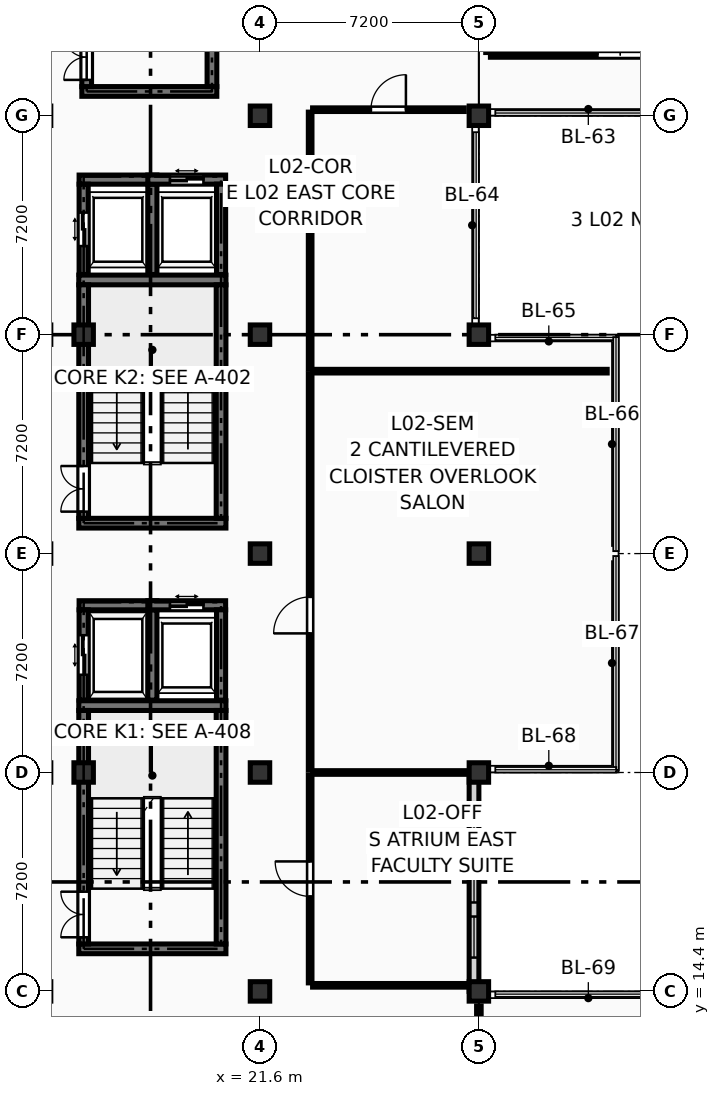
"""IFC4 building model, lengths in metres.
Left out: names, types, materials, properties, quantities, classifications, styles, units other than length and angle.
Written with IfcOpenShell. Run it as: python <this file> out.ifc"""

import sys

from ifc_helpers import new_model, si_unit, direction, frame, frame_2d, origin, origin_2d, place, context, subcontext, project, spatial, rectangle, extrude, element, fill, save


model = new_model("IFC4")
c1 = context("Model", 3, precision=1e-05, world=origin(), true_north=direction((0.0, 1.0)))
c2 = subcontext(c1, "Body", "Model", "MODEL_VIEW")
j1 = project(units=[si_unit("LENGTHUNIT", "METRE"), si_unit("PLANEANGLEUNIT", "RADIAN")], contexts=[c1])
p1 = place(None, origin())
s1 = spatial("IfcSite", under=j1, at=p1, CompositionType="ELEMENT")
p2 = place(p1, origin())
s2 = spatial("IfcBuilding", under=s1, at=p2, CompositionType="ELEMENT")
p3 = place(p2, frame((0.0, 0.0, 8.55)))
s3 = spatial("IfcBuildingStorey", under=s2, at=p3, CompositionType="ELEMENT", Elevation=8.55)
for number, where, z_axis, x_axis in (
    (1, (15.8, 21.6, 0.0), (0.0, 0.0, 1.0), (1.0, 0.0, 0.0)),
    (2, (15.8, 36.0, 0.0), (0.0, 0.0, 1.0), (1.0, 0.0, 0.0)),
    (3, (21.6, 14.4, 0.0), (0.0, 0.0, 1.0), (1.0, 0.0, 0.0)),
    (4, (21.6, 21.6, 0.0), (0.0, 0.0, 1.0), (1.0, 0.0, 0.0)),
    (5, (21.6, 28.8, 0.0), (0.0, 0.0, 1.0), (1.0, 0.0, 0.0)),
    (6, (21.6, 36.0, 0.0), (0.0, 0.0, 1.0), (1.0, 0.0, 0.0)),
    (7, (21.6, 43.2, 0.0), (0.0, 0.0, 1.0), (1.0, 0.0, 0.0)),
    (8, (28.8, 14.4, 0.0), (0.0, 0.0, 1.0), (1.0, 0.0, 0.0)),
    (9, (28.8, 21.6, 0.0), (0.0, 0.0, 1.0), (1.0, 0.0, 0.0)),
    (10, (28.8, 28.8, 0.0), (0.0, 0.0, 1.0), (1.0, 0.0, 0.0)),
    (11, (28.8, 36.0, 0.0), (0.0, 0.0, 1.0), (1.0, 0.0, 0.0)),
    (12, (28.8, 43.2, 0.0), (0.0, 0.0, 1.0), (1.0, 0.0, 0.0)),
):
    element("IfcColumn", number, at=place(p3, frame(where, z_axis=z_axis, x_axis=x_axis)), inside=s3, PredefinedType="COLUMN", context=c2, shape_type="SweptSolid", body=[
        extrude(rectangle(XDim=0.64, YDim=0.64, at=origin_2d()), origin(), (0.0, 0.0, 1.0), 3.6),
    ])
p4 = place(p3, frame((28.64, 14.4, 0.0), z_axis=(0.0, 0.0, 1.0), x_axis=(0.0, 1.0, 0.0)))
e13 = element("IfcWall", 13, at=p4, inside=s3, PredefinedType="SOLIDWALL", context=c2, shape_type="SweptSolid", body=[
    extrude(rectangle(XDim=7.2, YDim=0.32, at=frame_2d((3.6, 0.0))), origin(), (0.0, 0.0, 1.0), 2.84),
])
p5 = place(p4, frame((1.113, 0.0, 0.18)))
e14 = element("IfcOpeningElement", 14, at=p5, cuts=e13, PredefinedType="OPENING", context=c2, shape_type="SweptSolid", body=[
    extrude(rectangle(XDim=1.35, YDim=2.45, at=frame_2d((0.675, 1.225))), frame((0.0, 0.172, 0.0), z_axis=(0.0, -1.0, 0.0), x_axis=(1.0, 0.0, 0.0)), (0.0, 0.0, 1.0), 0.344),
])
p6 = place(p4, frame((2.925, 0.0, 0.18)))
e15 = element("IfcOpeningElement", 15, at=p6, cuts=e13, PredefinedType="OPENING", context=c2, shape_type="SweptSolid", body=[
    extrude(rectangle(XDim=1.35, YDim=2.45, at=frame_2d((0.675, 1.225))), frame((0.0, 0.172, 0.0), z_axis=(0.0, -1.0, 0.0), x_axis=(1.0, 0.0, 0.0)), (0.0, 0.0, 1.0), 0.344),
])
p7 = place(p4, frame((4.738, 0.0, 0.18)))
e16 = element("IfcOpeningElement", 16, at=p7, cuts=e13, PredefinedType="OPENING", context=c2, shape_type="SweptSolid", body=[
    extrude(rectangle(XDim=1.35, YDim=2.45, at=frame_2d((0.675, 1.225))), frame((0.0, 0.172, 0.0), z_axis=(0.0, -1.0, 0.0), x_axis=(1.0, 0.0, 0.0)), (0.0, 0.0, 1.0), 0.344),
])
for number, where, z_axis, x_axis in (
    (17, (15.64, 15.8, 0.0), (0.0, 0.0, 1.0), (1.0, 0.0, 0.0)),
    (18, (15.64, 23.8, 0.0), (0.0, 0.0, 1.0), (1.0, 0.0, 0.0)),
):
    element("IfcWall", number, at=place(p3, frame(where, z_axis=z_axis, x_axis=x_axis)), inside=s3, PredefinedType="SHEAR", context=c2, shape_type="SweptSolid", body=[
        extrude(rectangle(XDim=4.84, YDim=0.32, at=frame_2d((2.42, 0.0))), origin(), (0.0, 0.0, 1.0), 3.39),
    ])
p8 = place(p3, frame((15.8, 15.96, 0.0), z_axis=(0.0, 0.0, 1.0), x_axis=(0.0, 1.0, 0.0)))
e19 = element("IfcWall", 19, at=p8, inside=s3, PredefinedType="SHEAR", context=c2, shape_type="SweptSolid", body=[
    extrude(rectangle(XDim=7.68, YDim=0.32, at=frame_2d((3.84, 0.0))), origin(), (0.0, 0.0, 1.0), 3.39),
])
p9 = place(p8, frame((0.22, 0.0, 0.0)))
e20 = element("IfcOpeningElement", 20, at=p9, cuts=e19, PredefinedType="OPENING", context=c2, shape_type="SweptSolid", body=[
    extrude(rectangle(XDim=1.5, YDim=2.2, at=frame_2d((0.75, 1.1))), frame((0.0, 0.172, 0.0), z_axis=(0.0, -1.0, 0.0), x_axis=(1.0, 0.0, 0.0)), (0.0, 0.0, 1.0), 0.344),
])
p10 = place(p3, frame((20.32, 15.96, 0.0), z_axis=(0.0, 0.0, 1.0), x_axis=(0.0, 1.0, 0.0)))
e21 = element("IfcWall", 21, at=p10, inside=s3, PredefinedType="SHEAR", context=c2, shape_type="SweptSolid", body=[
    extrude(rectangle(XDim=7.68, YDim=0.32, at=frame_2d((3.84, 0.0))), origin(), (0.0, 0.0, 1.0), 3.39),
])
for number, where, z_axis, x_axis in (
    (22, (15.64, 29.8, 0.0), (0.0, 0.0, 1.0), (1.0, 0.0, 0.0)),
    (23, (15.64, 37.8, 0.0), (0.0, 0.0, 1.0), (1.0, 0.0, 0.0)),
):
    element("IfcWall", number, at=place(p3, frame(where, z_axis=z_axis, x_axis=x_axis)), inside=s3, PredefinedType="SHEAR", context=c2, shape_type="SweptSolid", body=[
        extrude(rectangle(XDim=4.84, YDim=0.32, at=frame_2d((2.42, 0.0))), origin(), (0.0, 0.0, 1.0), 3.39),
    ])
p11 = place(p3, frame((15.8, 29.96, 0.0), z_axis=(0.0, 0.0, 1.0), x_axis=(0.0, 1.0, 0.0)))
e24 = element("IfcWall", 24, at=p11, inside=s3, PredefinedType="SHEAR", context=c2, shape_type="SweptSolid", body=[
    extrude(rectangle(XDim=7.68, YDim=0.32, at=frame_2d((3.84, 0.0))), origin(), (0.0, 0.0, 1.0), 3.39),
])
p12 = place(p11, frame((0.22, 0.0, 0.0)))
e25 = element("IfcOpeningElement", 25, at=p12, cuts=e24, PredefinedType="OPENING", context=c2, shape_type="SweptSolid", body=[
    extrude(rectangle(XDim=1.5, YDim=2.2, at=frame_2d((0.75, 1.1))), frame((0.0, 0.172, 0.0), z_axis=(0.0, -1.0, 0.0), x_axis=(1.0, 0.0, 0.0)), (0.0, 0.0, 1.0), 0.344),
])
p13 = place(p3, frame((20.32, 29.96, 0.0), z_axis=(0.0, 0.0, 1.0), x_axis=(0.0, 1.0, 0.0)))
e26 = element("IfcWall", 26, at=p13, inside=s3, PredefinedType="SHEAR", context=c2, shape_type="SweptSolid", body=[
    extrude(rectangle(XDim=7.68, YDim=0.32, at=frame_2d((3.84, 0.0))), origin(), (0.0, 0.0, 1.0), 3.39),
])
p14 = place(p3, frame((15.74, 44.0, 0.0), z_axis=(0.0, 0.0, 1.0), x_axis=(1.0, 0.0, 0.0)))
e27 = element("IfcWall", 27, at=p14, inside=s3, PredefinedType="SHEAR", context=c2, shape_type="SweptSolid", body=[
    extrude(rectangle(XDim=4.44, YDim=0.32, at=frame_2d((2.22, 0.0))), origin(), (0.0, 0.0, 1.0), 3.39),
])
p15 = place(p3, frame((15.9, 44.16, 0.0), z_axis=(0.0, 0.0, 1.0), x_axis=(0.0, 1.0, 0.0)))
e28 = element("IfcWall", 28, at=p15, inside=s3, PredefinedType="SHEAR", context=c2, shape_type="SweptSolid", body=[
    extrude(rectangle(XDim=7.28, YDim=0.32, at=frame_2d((3.64, 0.0))), origin(), (0.0, 0.0, 1.0), 3.39),
])
p16 = place(p15, frame((0.22, 0.0, 0.0)))
e29 = element("IfcOpeningElement", 29, at=p16, cuts=e28, PredefinedType="OPENING", context=c2, shape_type="SweptSolid", body=[
    extrude(rectangle(XDim=1.5, YDim=2.2, at=frame_2d((0.75, 1.1))), frame((0.0, 0.172, 0.0), z_axis=(0.0, -1.0, 0.0), x_axis=(1.0, 0.0, 0.0)), (0.0, 0.0, 1.0), 0.344),
])
p17 = place(p3, frame((20.02, 44.16, 0.0), z_axis=(0.0, 0.0, 1.0), x_axis=(0.0, 1.0, 0.0)))
e30 = element("IfcWall", 30, at=p17, inside=s3, PredefinedType="SHEAR", context=c2, shape_type="SweptSolid", body=[
    extrude(rectangle(XDim=7.28, YDim=0.32, at=frame_2d((3.64, 0.0))), origin(), (0.0, 0.0, 1.0), 3.39),
])
p18 = place(p3, frame((15.65, 27.1, 0.0), z_axis=(0.0, 0.0, 1.0), x_axis=(1.0, 0.0, 0.0)))
e31 = element("IfcWall", 31, at=p18, inside=s3, PredefinedType="SHEAR", context=c2, shape_type="SweptSolid", body=[
    extrude(rectangle(XDim=2.56, YDim=0.3, at=frame_2d((1.28, 0.0))), origin(), (0.0, 0.0, 1.0), 3.39),
])
p19 = place(p3, frame((15.8, 23.98, 0.0), z_axis=(0.0, 0.0, 1.0), x_axis=(0.0, 1.0, 0.0)))
e32 = element("IfcWall", 32, at=p19, inside=s3, PredefinedType="SHEAR", context=c2, shape_type="SweptSolid", body=[
    extrude(rectangle(XDim=2.97, YDim=0.3, at=frame_2d((1.485, 0.0))), origin(), (0.0, 0.0, 1.0), 3.39),
])
p20 = place(p19, frame((0.835, 0.0, 0.0)))
e33 = element("IfcOpeningElement", 33, at=p20, cuts=e32, PredefinedType="OPENING", context=c2, shape_type="SweptSolid", body=[
    extrude(rectangle(XDim=1.3, YDim=2.25, at=frame_2d((0.65, 1.125))), frame((0.0, 0.162, 0.0), z_axis=(0.0, -1.0, 0.0), x_axis=(1.0, 0.0, 0.0)), (0.0, 0.0, 1.0), 0.324),
])
p21 = place(p3, frame((18.06, 23.98, 0.0), z_axis=(0.0, 0.0, 1.0), x_axis=(0.0, 1.0, 0.0)))
e34 = element("IfcWall", 34, at=p21, inside=s3, PredefinedType="SHEAR", context=c2, shape_type="SweptSolid", body=[
    extrude(rectangle(XDim=2.97, YDim=0.3, at=frame_2d((1.485, 0.0))), origin(), (0.0, 0.0, 1.0), 3.39),
])
p22 = place(p3, frame((17.91, 27.1, 0.0), z_axis=(0.0, 0.0, 1.0), x_axis=(1.0, 0.0, 0.0)))
e35 = element("IfcWall", 35, at=p22, inside=s3, PredefinedType="SHEAR", context=c2, shape_type="SweptSolid", body=[
    extrude(rectangle(XDim=2.56, YDim=0.3, at=frame_2d((1.28, 0.0))), origin(), (0.0, 0.0, 1.0), 3.39),
])
p23 = place(p22, frame((0.73, 0.0, 0.0)))
e36 = element("IfcOpeningElement", 36, at=p23, cuts=e35, PredefinedType="OPENING", context=c2, shape_type="SweptSolid", body=[
    extrude(rectangle(XDim=1.1, YDim=2.2, at=frame_2d((0.55, 1.1))), frame((0.0, 0.162, 0.0), z_axis=(0.0, -1.0, 0.0), x_axis=(1.0, 0.0, 0.0)), (0.0, 0.0, 1.0), 0.324),
])
p24 = place(p3, frame((20.32, 23.98, 0.0), z_axis=(0.0, 0.0, 1.0), x_axis=(0.0, 1.0, 0.0)))
e37 = element("IfcWall", 37, at=p24, inside=s3, PredefinedType="SHEAR", context=c2, shape_type="SweptSolid", body=[
    extrude(rectangle(XDim=2.97, YDim=0.3, at=frame_2d((1.485, 0.0))), origin(), (0.0, 0.0, 1.0), 3.39),
])
p25 = place(p3, frame((15.65, 41.1, 0.0), z_axis=(0.0, 0.0, 1.0), x_axis=(1.0, 0.0, 0.0)))
e38 = element("IfcWall", 38, at=p25, inside=s3, PredefinedType="SHEAR", context=c2, shape_type="SweptSolid", body=[
    extrude(rectangle(XDim=2.56, YDim=0.3, at=frame_2d((1.28, 0.0))), origin(), (0.0, 0.0, 1.0), 3.39),
])
p26 = place(p3, frame((15.8, 37.98, 0.0), z_axis=(0.0, 0.0, 1.0), x_axis=(0.0, 1.0, 0.0)))
e39 = element("IfcWall", 39, at=p26, inside=s3, PredefinedType="SHEAR", context=c2, shape_type="SweptSolid", body=[
    extrude(rectangle(XDim=2.97, YDim=0.3, at=frame_2d((1.485, 0.0))), origin(), (0.0, 0.0, 1.0), 3.39),
])
p27 = place(p26, frame((0.935, 0.0, 0.0)))
e40 = element("IfcOpeningElement", 40, at=p27, cuts=e39, PredefinedType="OPENING", context=c2, shape_type="SweptSolid", body=[
    extrude(rectangle(XDim=1.1, YDim=2.2, at=frame_2d((0.55, 1.1))), frame((0.0, 0.162, 0.0), z_axis=(0.0, -1.0, 0.0), x_axis=(1.0, 0.0, 0.0)), (0.0, 0.0, 1.0), 0.324),
])
p28 = place(p3, frame((18.06, 37.98, 0.0), z_axis=(0.0, 0.0, 1.0), x_axis=(0.0, 1.0, 0.0)))
e41 = element("IfcWall", 41, at=p28, inside=s3, PredefinedType="SHEAR", context=c2, shape_type="SweptSolid", body=[
    extrude(rectangle(XDim=2.97, YDim=0.3, at=frame_2d((1.485, 0.0))), origin(), (0.0, 0.0, 1.0), 3.39),
])
p29 = place(p3, frame((17.91, 41.1, 0.0), z_axis=(0.0, 0.0, 1.0), x_axis=(1.0, 0.0, 0.0)))
e42 = element("IfcWall", 42, at=p29, inside=s3, PredefinedType="SHEAR", context=c2, shape_type="SweptSolid", body=[
    extrude(rectangle(XDim=2.56, YDim=0.3, at=frame_2d((1.28, 0.0))), origin(), (0.0, 0.0, 1.0), 3.39),
])
p30 = place(p29, frame((0.73, 0.0, 0.0)))
e43 = element("IfcOpeningElement", 43, at=p30, cuts=e42, PredefinedType="OPENING", context=c2, shape_type="SweptSolid", body=[
    extrude(rectangle(XDim=1.1, YDim=2.2, at=frame_2d((0.55, 1.1))), frame((0.0, 0.162, 0.0), z_axis=(0.0, -1.0, 0.0), x_axis=(1.0, 0.0, 0.0)), (0.0, 0.0, 1.0), 0.324),
])
p31 = place(p3, frame((20.32, 37.98, 0.0), z_axis=(0.0, 0.0, 1.0), x_axis=(0.0, 1.0, 0.0)))
e44 = element("IfcWall", 44, at=p31, inside=s3, PredefinedType="SHEAR", context=c2, shape_type="SweptSolid", body=[
    extrude(rectangle(XDim=2.97, YDim=0.3, at=frame_2d((1.485, 0.0))), origin(), (0.0, 0.0, 1.0), 3.39),
])
p32 = place(p3, frame((28.8, 9.68, 0.0), z_axis=(0.0, 0.0, 1.0), x_axis=(0.0, 1.0, 0.0)))
e45 = element("IfcWall", 45, at=p32, inside=s3, PredefinedType="PARTITIONING", context=c2, shape_type="SweptSolid", body=[
    extrude(rectangle(XDim=4.24, YDim=0.15, at=frame_2d((2.12, 0.0))), origin(), (0.0, 0.0, 1.0), 2.655),
])
p33 = place(p3, frame((23.25, 14.68, 0.0), z_axis=(0.0, 0.0, 1.0), x_axis=(0.0, 1.0, 0.0)))
e46 = element("IfcWall", 46, at=p33, inside=s3, PredefinedType="PARTITIONING", context=c2, shape_type="SweptSolid", body=[
    extrude(rectangle(XDim=6.84, YDim=0.12, at=frame_2d((3.42, 0.0))), origin(), (0.0, 0.0, 1.0), 3.375),
])
p34 = place(p33, frame((2.845, 0.0, 0.0)))
e47 = element("IfcOpeningElement", 47, at=p34, cuts=e46, PredefinedType="OPENING", context=c2, shape_type="SweptSolid", body=[
    extrude(rectangle(XDim=1.15, YDim=2.18, at=frame_2d((0.575, 1.09))), frame((0.0, 0.072, 0.0), z_axis=(0.0, -1.0, 0.0), x_axis=(1.0, 0.0, 0.0)), (0.0, 0.0, 1.0), 0.144),
])
p35 = place(p3, frame((23.33, 14.6, 0.0), z_axis=(0.0, 0.0, 1.0), x_axis=(1.0, 0.0, 0.0)))
e48 = element("IfcWall", 48, at=p35, inside=s3, PredefinedType="PARTITIONING", context=c2, shape_type="SweptSolid", body=[
    extrude(rectangle(XDim=5.09, YDim=0.12, at=frame_2d((2.545, 0.0))), origin(), (0.0, 0.0, 1.0), 2.595),
])
p36 = place(p3, frame((23.33, 21.6, 0.0), z_axis=(0.0, 0.0, 1.0), x_axis=(1.0, 0.0, 0.0)))
e49 = element("IfcWall", 49, at=p36, inside=s3, PredefinedType="PARTITIONING", context=c2, shape_type="SweptSolid", body=[
    extrude(rectangle(XDim=5.09, YDim=0.12, at=frame_2d((2.545, 0.0))), origin(), (0.0, 0.0, 1.0), 2.691),
])
p37 = place(p3, frame((23.25, 21.68, 0.0), z_axis=(0.0, 0.0, 1.0), x_axis=(0.0, 1.0, 0.0)))
e50 = element("IfcWall", 50, at=p37, inside=s3, PredefinedType="PARTITIONING", context=c2, shape_type="SweptSolid", body=[
    extrude(rectangle(XDim=13.04, YDim=0.12, at=frame_2d((6.52, 0.0))), origin(), (0.0, 0.0, 1.0), 3.375),
])
p38 = place(p37, frame((4.495, 0.0, 0.0)))
e51 = element("IfcOpeningElement", 51, at=p38, cuts=e50, PredefinedType="OPENING", context=c2, shape_type="SweptSolid", body=[
    extrude(rectangle(XDim=1.2, YDim=2.15, at=frame_2d((0.6, 1.075))), frame((0.0, 0.072, 0.0), z_axis=(0.0, -1.0, 0.0), x_axis=(1.0, 0.0, 0.0)), (0.0, 0.0, 1.0), 0.144),
])
p39 = place(p3, frame((23.33, 34.8, 0.0), z_axis=(0.0, 0.0, 1.0), x_axis=(1.0, 0.0, 0.0)))
e52 = element("IfcWall", 52, at=p39, inside=s3, PredefinedType="PARTITIONING", context=c2, shape_type="SweptSolid", body=[
    extrude(rectangle(XDim=9.69, YDim=0.12, at=frame_2d((4.845, 0.0))), origin(), (0.0, 0.0, 1.0), 3.375),
])
p40 = place(p3, frame((23.25, 34.88, 0.0), z_axis=(0.0, 0.0, 1.0), x_axis=(0.0, 1.0, 0.0)))
e53 = element("IfcWall", 53, at=p40, inside=s3, PredefinedType="PARTITIONING", context=c2, shape_type="SweptSolid", body=[
    extrude(rectangle(XDim=8.44, YDim=0.12, at=frame_2d((4.22, 0.0))), origin(), (0.0, 0.0, 1.0), 3.375),
])
p41 = place(p3, frame((23.33, 43.4, 0.0), z_axis=(0.0, 0.0, 1.0), x_axis=(1.0, 0.0, 0.0)))
e54 = element("IfcWall", 54, at=p41, inside=s3, PredefinedType="PARTITIONING", context=c2, shape_type="SweptSolid", body=[
    extrude(rectangle(XDim=4.99, YDim=0.12, at=frame_2d((2.495, 0.0))), origin(), (0.0, 0.0, 1.0), 2.595),
])
p42 = place(p41, frame((1.92, 0.0, 0.0)))
e55 = element("IfcOpeningElement", 55, at=p42, cuts=e54, PredefinedType="OPENING", context=c2, shape_type="SweptSolid", body=[
    extrude(rectangle(XDim=1.15, YDim=2.18, at=frame_2d((0.575, 1.09))), frame((0.0, 0.072, 0.0), z_axis=(0.0, -1.0, 0.0), x_axis=(1.0, 0.0, 0.0)), (0.0, 0.0, 1.0), 0.144),
])
p43 = place(p3, frame((29.1, 45.28, 0.0), z_axis=(0.0, 0.0, 1.0), x_axis=(0.0, 1.0, 0.0)))
e56 = element("IfcWall", 56, at=p43, inside=s3, PredefinedType="PARTITIONING", context=c2, shape_type="SweptSolid", body=[
    extrude(rectangle(XDim=10.64, YDim=0.15, at=frame_2d((5.32, 0.0))), origin(), (0.0, 0.0, 1.0), 2.655),
])
p44 = place(p3, frame((29.18, 45.2, 0.0), z_axis=(0.0, 0.0, 1.0), x_axis=(1.0, 0.0, 0.0)))
e57 = element("IfcWall", 57, at=p44, inside=s3, PredefinedType="PARTITIONING", context=c2, shape_type="SweptSolid", body=[
    extrude(rectangle(XDim=8.54, YDim=0.15, at=frame_2d((4.27, 0.0))), origin(), (0.0, 0.0, 1.0), 3.375),
])
p45 = place(p44, frame((3.52, 0.0, 0.0)))
e58 = element("IfcOpeningElement", 58, at=p45, cuts=e57, PredefinedType="OPENING", context=c2, shape_type="SweptSolid", body=[
    extrude(rectangle(XDim=1.5, YDim=2.2, at=frame_2d((0.75, 1.1))), frame((0.0, 0.087, 0.0), z_axis=(0.0, -1.0, 0.0), x_axis=(1.0, 0.0, 0.0)), (0.0, 0.0, 1.0), 0.174),
])
p46 = place(p5, origin())
e59 = element("IfcWindow", 59, at=p46, inside=s3, PartitioningType="SINGLE_PANEL", PredefinedType="WINDOW", context=c2, shape_type="SweptSolid", body=[
    extrude(rectangle(XDim=1.35, YDim=2.45, at=frame_2d((0.675, 1.225))), frame((0.0, 0.03, 0.0), z_axis=(0.0, -1.0, 0.0), x_axis=(1.0, 0.0, 0.0)), (0.0, 0.0, 1.0), 0.06),
])
fill(e14, e59)
p47 = place(p6, origin())
e60 = element("IfcWindow", 60, at=p47, inside=s3, PartitioningType="SINGLE_PANEL", PredefinedType="WINDOW", context=c2, shape_type="SweptSolid", body=[
    extrude(rectangle(XDim=1.35, YDim=2.45, at=frame_2d((0.675, 1.225))), frame((0.0, 0.03, 0.0), z_axis=(0.0, -1.0, 0.0), x_axis=(1.0, 0.0, 0.0)), (0.0, 0.0, 1.0), 0.06),
])
fill(e15, e60)
p48 = place(p7, origin())
e61 = element("IfcWindow", 61, at=p48, inside=s3, PartitioningType="SINGLE_PANEL", PredefinedType="WINDOW", context=c2, shape_type="SweptSolid", body=[
    extrude(rectangle(XDim=1.35, YDim=2.45, at=frame_2d((0.675, 1.225))), frame((0.0, 0.03, 0.0), z_axis=(0.0, -1.0, 0.0), x_axis=(1.0, 0.0, 0.0)), (0.0, 0.0, 1.0), 0.06),
])
fill(e16, e61)
p49 = place(p9, origin())
e62 = element("IfcDoor", 62, at=p49, inside=s3, OperationType="DOUBLE_DOOR_SINGLE_SWING", PredefinedType="DOOR", context=c2, shape_type="SweptSolid", body=[
    extrude(rectangle(XDim=1.5, YDim=2.2, at=frame_2d((0.75, 1.1))), frame((0.0, 0.025, 0.0), z_axis=(0.0, -1.0, 0.0), x_axis=(1.0, 0.0, 0.0)), (0.0, 0.0, 1.0), 0.05),
])
fill(e20, e62)
p50 = place(p12, origin())
e63 = element("IfcDoor", 63, at=p50, inside=s3, OperationType="DOUBLE_DOOR_SINGLE_SWING", PredefinedType="DOOR", context=c2, shape_type="SweptSolid", body=[
    extrude(rectangle(XDim=1.5, YDim=2.2, at=frame_2d((0.75, 1.1))), frame((0.0, 0.025, 0.0), z_axis=(0.0, -1.0, 0.0), x_axis=(1.0, 0.0, 0.0)), (0.0, 0.0, 1.0), 0.05),
])
fill(e25, e63)
p51 = place(p16, origin())
e64 = element("IfcDoor", 64, at=p51, inside=s3, OperationType="DOUBLE_DOOR_SINGLE_SWING", PredefinedType="DOOR", context=c2, shape_type="SweptSolid", body=[
    extrude(rectangle(XDim=1.5, YDim=2.2, at=frame_2d((0.75, 1.1))), frame((0.0, 0.025, 0.0), z_axis=(0.0, -1.0, 0.0), x_axis=(1.0, 0.0, 0.0)), (0.0, 0.0, 1.0), 0.05),
])
fill(e29, e64)
p52 = place(p20, origin())
e65 = element("IfcDoor", 65, at=p52, inside=s3, OperationType="DOUBLE_DOOR_SLIDING", PredefinedType="DOOR", context=c2, shape_type="SweptSolid", body=[
    extrude(rectangle(XDim=1.3, YDim=2.25, at=frame_2d((0.65, 1.125))), frame((0.0, 0.025, 0.0), z_axis=(0.0, -1.0, 0.0), x_axis=(1.0, 0.0, 0.0)), (0.0, 0.0, 1.0), 0.05),
])
fill(e33, e65)
p53 = place(p23, origin())
e66 = element("IfcDoor", 66, at=p53, inside=s3, OperationType="DOUBLE_DOOR_SLIDING", PredefinedType="DOOR", context=c2, shape_type="SweptSolid", body=[
    extrude(rectangle(XDim=1.1, YDim=2.2, at=frame_2d((0.55, 1.1))), frame((0.0, 0.025, 0.0), z_axis=(0.0, -1.0, 0.0), x_axis=(1.0, 0.0, 0.0)), (0.0, 0.0, 1.0), 0.05),
])
fill(e36, e66)
p54 = place(p27, origin())
e67 = element("IfcDoor", 67, at=p54, inside=s3, OperationType="DOUBLE_DOOR_SLIDING", PredefinedType="DOOR", context=c2, shape_type="SweptSolid", body=[
    extrude(rectangle(XDim=1.1, YDim=2.2, at=frame_2d((0.55, 1.1))), frame((0.0, 0.025, 0.0), z_axis=(0.0, -1.0, 0.0), x_axis=(1.0, 0.0, 0.0)), (0.0, 0.0, 1.0), 0.05),
])
fill(e40, e67)
p55 = place(p30, origin())
e68 = element("IfcDoor", 68, at=p55, inside=s3, OperationType="DOUBLE_DOOR_SLIDING", PredefinedType="DOOR", context=c2, shape_type="SweptSolid", body=[
    extrude(rectangle(XDim=1.1, YDim=2.2, at=frame_2d((0.55, 1.1))), frame((0.0, 0.025, 0.0), z_axis=(0.0, -1.0, 0.0), x_axis=(1.0, 0.0, 0.0)), (0.0, 0.0, 1.0), 0.05),
])
fill(e43, e68)
p56 = place(p34, origin())
e69 = element("IfcDoor", 69, at=p56, inside=s3, OperationType="SINGLE_SWING_RIGHT", PredefinedType="DOOR", context=c2, shape_type="SweptSolid", body=[
    extrude(rectangle(XDim=1.15, YDim=2.18, at=frame_2d((0.575, 1.09))), frame((0.0, 0.025, 0.0), z_axis=(0.0, -1.0, 0.0), x_axis=(1.0, 0.0, 0.0)), (0.0, 0.0, 1.0), 0.05),
])
fill(e47, e69)
p57 = place(p38, origin())
e70 = element("IfcDoor", 70, at=p57, inside=s3, OperationType="SINGLE_SWING_LEFT", PredefinedType="DOOR", context=c2, shape_type="SweptSolid", body=[
    extrude(rectangle(XDim=1.2, YDim=2.15, at=frame_2d((0.6, 1.075))), frame((0.0, 0.025, 0.0), z_axis=(0.0, -1.0, 0.0), x_axis=(1.0, 0.0, 0.0)), (0.0, 0.0, 1.0), 0.05),
])
fill(e51, e70)
p58 = place(p42, origin())
e71 = element("IfcDoor", 71, at=p58, inside=s3, OperationType="SINGLE_SWING_RIGHT", PredefinedType="DOOR", context=c2, shape_type="SweptSolid", body=[
    extrude(rectangle(XDim=1.15, YDim=2.18, at=frame_2d((0.575, 1.09))), frame((0.0, 0.025, 0.0), z_axis=(0.0, -1.0, 0.0), x_axis=(1.0, 0.0, 0.0)), (0.0, 0.0, 1.0), 0.05),
])
fill(e55, e71)
p59 = place(p45, origin())
e72 = element("IfcDoor", 72, at=p59, inside=s3, OperationType="DOUBLE_DOOR_SINGLE_SWING", PredefinedType="DOOR", context=c2, shape_type="SweptSolid", body=[
    extrude(rectangle(XDim=1.5, YDim=2.2, at=frame_2d((0.75, 1.1))), frame((0.0, 0.025, 0.0), z_axis=(0.0, -1.0, 0.0), x_axis=(1.0, 0.0, 0.0)), (0.0, 0.0, 1.0), 0.05),
])
fill(e58, e72)
save(model, sys.argv[1])
